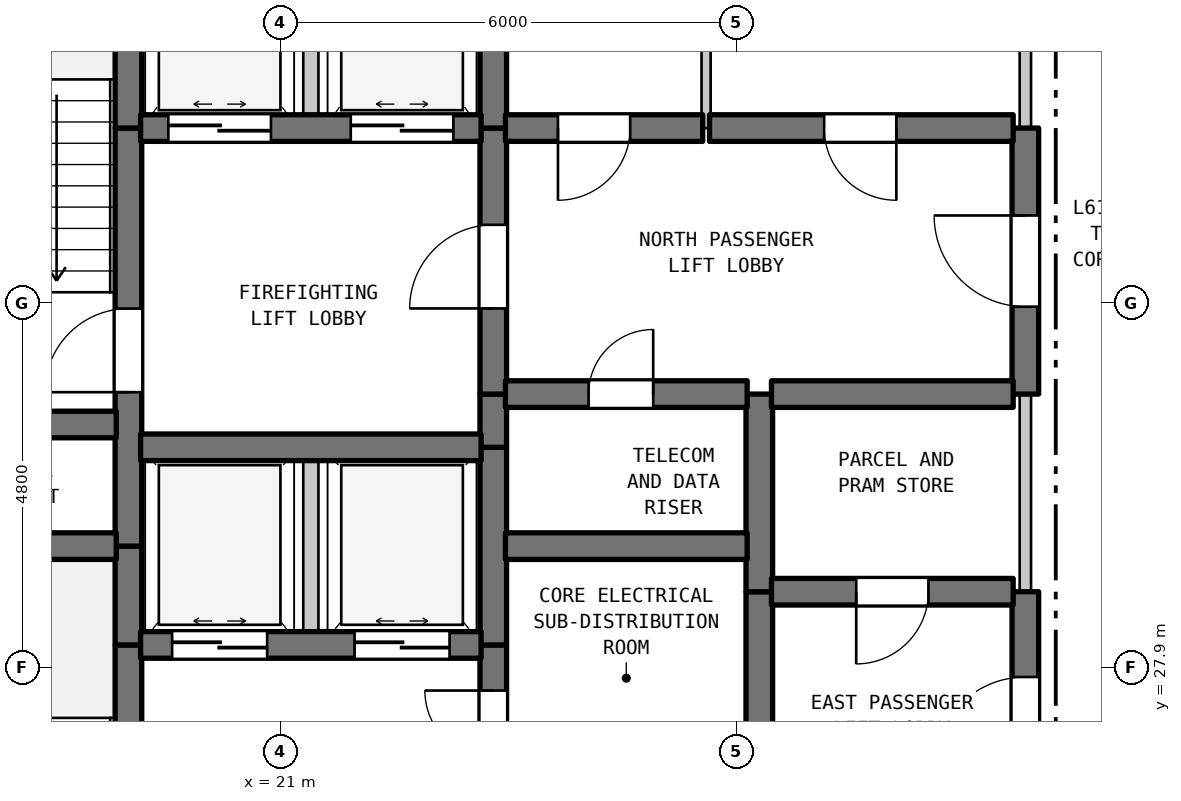
"""IFC4 building model, lengths in metres.
Left out: names, types, materials, properties, quantities, classifications, styles, units other than length and angle.
Written with IfcOpenShell. Run it as: python <this file> out.ifc"""

import sys

from ifc_helpers import new_model, si_unit, direction, frame, frame_2d, origin, place, context, subcontext, project, spatial, rectangle, extrude, element, fill, save


model = new_model("IFC4")
c1 = context("Model", 3, precision=1e-05, world=origin(), true_north=direction((0.0, 1.0)))
c2 = subcontext(c1, "Body", "Model", "MODEL_VIEW")
j1 = project(units=[si_unit("LENGTHUNIT", "METRE"), si_unit("PLANEANGLEUNIT", "RADIAN")], contexts=[c1])
p1 = place(None, origin())
s1 = spatial("IfcSite", under=j1, at=p1, CompositionType="ELEMENT")
p2 = place(p1, origin())
s2 = spatial("IfcBuilding", under=s1, at=p2, CompositionType="ELEMENT")
p3 = place(p2, frame((0.0, 0.0, 247.3)))
s3 = spatial("IfcBuildingStorey", under=s2, at=p3, CompositionType="ELEMENT", Elevation=247.3)
p4 = place(p3, frame((19.0, 22.7, 0.0), z_axis=(0.0, 0.0, 1.0), x_axis=(0.0, 1.0, 0.0)))
e1 = element("IfcWall", 1, at=p4, inside=s3, PredefinedType="SHEAR", context=c2, shape_type="SweptSolid", body=[
    extrude(rectangle(XDim=5.5, YDim=0.35, at=frame_2d((2.75, 0.0))), origin(), (0.0, 0.0, 1.0), 3.39),
])
p5 = place(p4, frame((0.631, 0.0, 0.0)))
e2 = element("IfcOpeningElement", 2, at=p5, cuts=e1, PredefinedType="OPENING", context=c2, shape_type="SweptSolid", body=[
    extrude(rectangle(XDim=1.1, YDim=2.15, at=frame_2d((0.55, 1.075))), frame((0.0, 0.185, 0.0), z_axis=(0.0, -1.0, 0.0), x_axis=(1.0, 0.0, 0.0)), (0.0, 0.0, 1.0), 0.37),
])
p6 = place(p3, frame((19.0, 28.2, 0.0), z_axis=(0.0, 0.0, 1.0), x_axis=(0.0, 1.0, 0.0)))
e3 = element("IfcWall", 3, at=p6, inside=s3, PredefinedType="SHEAR", context=c2, shape_type="SweptSolid", body=[
    extrude(rectangle(XDim=1.3, YDim=0.35, at=frame_2d((0.65, 0.0))), origin(), (0.0, 0.0, 1.0), 3.39),
])
p7 = place(p3, frame((19.0, 29.5, 0.0), z_axis=(0.0, 0.0, 1.0), x_axis=(0.0, 1.0, 0.0)))
e4 = element("IfcWall", 4, at=p7, inside=s3, PredefinedType="SHEAR", context=c2, shape_type="SweptSolid", body=[
    extrude(rectangle(XDim=5.5, YDim=0.35, at=frame_2d((2.75, 0.0))), origin(), (0.0, 0.0, 1.0), 3.39),
])
p8 = place(p7, frame((2.025, 0.0, 0.0)))
e5 = element("IfcOpeningElement", 5, at=p8, cuts=e4, PredefinedType="OPENING", context=c2, shape_type="SweptSolid", body=[
    extrude(rectangle(XDim=1.1, YDim=2.15, at=frame_2d((0.55, 1.075))), frame((0.0, 0.185, 0.0), z_axis=(0.0, -1.0, 0.0), x_axis=(1.0, 0.0, 0.0)), (0.0, 0.0, 1.0), 0.37),
])
p9 = place(p3, frame((19.0, 35.0, 0.0), z_axis=(0.0, 0.0, 1.0), x_axis=(0.0, 1.0, 0.0)))
e6 = element("IfcWall", 6, at=p9, inside=s3, PredefinedType="SHEAR", context=c2, shape_type="SweptSolid", body=[
    extrude(rectangle(XDim=2.9, YDim=0.35, at=frame_2d((1.45, 0.0))), origin(), (0.0, 0.0, 1.0), 3.39),
])
p10 = place(p3, frame((21.4, 28.2, 0.0), z_axis=(0.0, 0.0, 1.0), x_axis=(0.0, 1.0, 0.0)))
e7 = element("IfcWall", 7, at=p10, inside=s3, PredefinedType="STANDARD", context=c2, shape_type="SweptSolid", body=[
    extrude(rectangle(XDim=2.6, YDim=0.2, at=frame_2d((1.3, 0.0))), origin(), (0.0, 0.0, 1.0), 3.39),
])
p11 = place(p3, frame((21.4, 35.0, 0.0), z_axis=(0.0, 0.0, 1.0), x_axis=(0.0, 1.0, 0.0)))
e8 = element("IfcWall", 8, at=p11, inside=s3, PredefinedType="STANDARD", context=c2, shape_type="SweptSolid", body=[
    extrude(rectangle(XDim=2.9, YDim=0.2, at=frame_2d((1.45, 0.0))), origin(), (0.0, 0.0, 1.0), 3.39),
])
p12 = place(p3, frame((23.8, 26.1, 0.0), z_axis=(0.0, 0.0, 1.0), x_axis=(0.0, 1.0, 0.0)))
e9 = element("IfcWall", 9, at=p12, inside=s3, PredefinedType="SHEAR", context=c2, shape_type="SweptSolid", body=[
    extrude(rectangle(XDim=2.1, YDim=0.35, at=frame_2d((1.05, 0.0))), origin(), (0.0, 0.0, 1.0), 3.39),
])
p13 = place(p12, frame((0.6, 0.0, 0.0)))
e10 = element("IfcOpeningElement", 10, at=p13, cuts=e9, PredefinedType="OPENING", context=c2, shape_type="SweptSolid", body=[
    extrude(rectangle(XDim=0.9, YDim=2.15, at=frame_2d((0.45, 1.075))), frame((0.0, 0.185, 0.0), z_axis=(0.0, -1.0, 0.0), x_axis=(1.0, 0.0, 0.0)), (0.0, 0.0, 1.0), 0.37),
])
p14 = place(p3, frame((23.8, 28.2, 0.0), z_axis=(0.0, 0.0, 1.0), x_axis=(0.0, 1.0, 0.0)))
e11 = element("IfcWall", 11, at=p14, inside=s3, PredefinedType="SHEAR", context=c2, shape_type="SweptSolid", body=[
    extrude(rectangle(XDim=2.6, YDim=0.35, at=frame_2d((1.3, 0.0))), origin(), (0.0, 0.0, 1.0), 3.39),
])
p15 = place(p3, frame((23.8, 30.8, 0.0), z_axis=(0.0, 0.0, 1.0), x_axis=(0.0, 1.0, 0.0)))
e12 = element("IfcWall", 12, at=p15, inside=s3, PredefinedType="SHEAR", context=c2, shape_type="SweptSolid", body=[
    extrude(rectangle(XDim=0.7, YDim=0.35, at=frame_2d((0.35, 0.0))), origin(), (0.0, 0.0, 1.0), 3.39),
])
p16 = place(p3, frame((23.8, 31.5, 0.0), z_axis=(0.0, 0.0, 1.0), x_axis=(0.0, 1.0, 0.0)))
e13 = element("IfcWall", 13, at=p16, inside=s3, PredefinedType="SHEAR", context=c2, shape_type="SweptSolid", body=[
    extrude(rectangle(XDim=3.5, YDim=0.35, at=frame_2d((1.75, 0.0))), origin(), (0.0, 0.0, 1.0), 3.39),
])
p17 = place(p16, frame((1.127, 0.0, 0.0)))
e14 = element("IfcOpeningElement", 14, at=p17, cuts=e13, PredefinedType="OPENING", context=c2, shape_type="SweptSolid", body=[
    extrude(rectangle(XDim=1.1, YDim=2.15, at=frame_2d((0.55, 1.075))), frame((0.0, 0.185, 0.0), z_axis=(0.0, -1.0, 0.0), x_axis=(1.0, 0.0, 0.0)), (0.0, 0.0, 1.0), 0.37),
])
p18 = place(p3, frame((23.8, 35.0, 0.0), z_axis=(0.0, 0.0, 1.0), x_axis=(0.0, 1.0, 0.0)))
e15 = element("IfcWall", 15, at=p18, inside=s3, PredefinedType="SHEAR", context=c2, shape_type="SweptSolid", body=[
    extrude(rectangle(XDim=2.9, YDim=0.35, at=frame_2d((1.45, 0.0))), origin(), (0.0, 0.0, 1.0), 3.39),
])
p19 = place(p3, frame((26.6, 35.0, 0.0), z_axis=(0.0, 0.0, 1.0), x_axis=(0.0, 1.0, 0.0)))
e16 = element("IfcWall", 16, at=p19, inside=s3, PredefinedType="PARTITIONING", context=c2, shape_type="SweptSolid", body=[
    extrude(rectangle(XDim=2.9, YDim=0.12, at=frame_2d((1.45, 0.0))), origin(), (0.0, 0.0, 1.0), 3.39),
])
p20 = place(p3, frame((27.3, 26.1, 0.0), z_axis=(0.0, 0.0, 1.0), x_axis=(0.0, 1.0, 0.0)))
e17 = element("IfcWall", 17, at=p20, inside=s3, PredefinedType="SHEAR", context=c2, shape_type="SweptSolid", body=[
    extrude(rectangle(XDim=2.8, YDim=0.35, at=frame_2d((1.4, 0.0))), origin(), (0.0, 0.0, 1.0), 3.39),
])
p21 = place(p3, frame((27.3, 28.9, 0.0), z_axis=(0.0, 0.0, 1.0), x_axis=(0.0, 1.0, 0.0)))
e18 = element("IfcWall", 18, at=p21, inside=s3, PredefinedType="SHEAR", context=c2, shape_type="SweptSolid", body=[
    extrude(rectangle(XDim=2.6, YDim=0.35, at=frame_2d((1.3, 0.0))), origin(), (0.0, 0.0, 1.0), 3.39),
])
p22 = place(p3, frame((30.8, 25.6, 0.0), z_axis=(0.0, 0.0, 1.0), x_axis=(0.0, 1.0, 0.0)))
e19 = element("IfcWall", 19, at=p22, inside=s3, PredefinedType="SHEAR", context=c2, shape_type="SweptSolid", body=[
    extrude(rectangle(XDim=3.3, YDim=0.35, at=frame_2d((1.65, 0.0))), origin(), (0.0, 0.0, 1.0), 3.39),
])
p23 = place(p22, frame((0.978, 0.0, 0.0)))
e20 = element("IfcOpeningElement", 20, at=p23, cuts=e19, PredefinedType="OPENING", context=c2, shape_type="SweptSolid", body=[
    extrude(rectangle(XDim=1.2, YDim=2.2, at=frame_2d((0.6, 1.1))), frame((0.0, 0.185, 0.0), z_axis=(0.0, -1.0, 0.0), x_axis=(1.0, 0.0, 0.0)), (0.0, 0.0, 1.0), 0.37),
])
p24 = place(p3, frame((30.8, 28.9, 0.0), z_axis=(0.0, 0.0, 1.0), x_axis=(0.0, 1.0, 0.0)))
e21 = element("IfcWall", 21, at=p24, inside=s3, PredefinedType="STANDARD", context=c2, shape_type="SweptSolid", body=[
    extrude(rectangle(XDim=2.6, YDim=0.15, at=frame_2d((1.3, 0.0))), origin(), (0.0, 0.0, 1.0), 3.39),
])
p25 = place(p3, frame((30.8, 31.5, 0.0), z_axis=(0.0, 0.0, 1.0), x_axis=(0.0, 1.0, 0.0)))
e22 = element("IfcWall", 22, at=p25, inside=s3, PredefinedType="SHEAR", context=c2, shape_type="SweptSolid", body=[
    extrude(rectangle(XDim=3.5, YDim=0.35, at=frame_2d((1.75, 0.0))), origin(), (0.0, 0.0, 1.0), 3.39),
])
p26 = place(p25, frame((1.15, 0.0, 0.0)))
e23 = element("IfcOpeningElement", 23, at=p26, cuts=e22, PredefinedType="OPENING", context=c2, shape_type="SweptSolid", body=[
    extrude(rectangle(XDim=1.2, YDim=2.2, at=frame_2d((0.6, 1.1))), frame((0.0, 0.185, 0.0), z_axis=(0.0, -1.0, 0.0), x_axis=(1.0, 0.0, 0.0)), (0.0, 0.0, 1.0), 0.37),
])
p27 = place(p3, frame((30.8, 35.0, 0.0), z_axis=(0.0, 0.0, 1.0), x_axis=(0.0, 1.0, 0.0)))
e24 = element("IfcWall", 24, at=p27, inside=s3, PredefinedType="STANDARD", context=c2, shape_type="SweptSolid", body=[
    extrude(rectangle(XDim=2.9, YDim=0.15, at=frame_2d((1.45, 0.0))), origin(), (0.0, 0.0, 1.0), 3.39),
])
p28 = place(p3, frame((19.16, 28.2, 0.0), z_axis=(0.0, 0.0, 1.0), x_axis=(1.0, 0.0, 0.0)))
e25 = element("IfcWall", 25, at=p28, inside=s3, PredefinedType="SHEAR", context=c2, shape_type="SweptSolid", body=[
    extrude(rectangle(XDim=4.48, YDim=0.35, at=frame_2d((2.24, 0.0))), origin(), (0.0, 0.0, 1.0), 3.39),
])
p29 = place(p28, frame((0.415, 0.0, 0.0)))
e26 = element("IfcOpeningElement", 26, at=p29, cuts=e25, PredefinedType="OPENING", context=c2, shape_type="SweptSolid", body=[
    extrude(rectangle(XDim=1.25, YDim=2.2, at=frame_2d((0.625, 1.1))), frame((0.0, 0.185, 0.0), z_axis=(0.0, -1.0, 0.0), x_axis=(1.0, 0.0, 0.0)), (0.0, 0.0, 1.0), 0.37),
])
p30 = place(p28, frame((2.815, 0.0, 0.0)))
e27 = element("IfcOpeningElement", 27, at=p30, cuts=e25, PredefinedType="OPENING", context=c2, shape_type="SweptSolid", body=[
    extrude(rectangle(XDim=1.25, YDim=2.2, at=frame_2d((0.625, 1.1))), frame((0.0, 0.185, 0.0), z_axis=(0.0, -1.0, 0.0), x_axis=(1.0, 0.0, 0.0)), (0.0, 0.0, 1.0), 0.37),
])
p31 = place(p3, frame((27.46, 28.9, 0.0), z_axis=(0.0, 0.0, 1.0), x_axis=(1.0, 0.0, 0.0)))
e28 = element("IfcWall", 28, at=p31, inside=s3, PredefinedType="SHEAR", context=c2, shape_type="SweptSolid", body=[
    extrude(rectangle(XDim=3.18, YDim=0.35, at=frame_2d((1.59, 0.0))), origin(), (0.0, 0.0, 1.0), 3.39),
])
p32 = place(p31, frame((1.115, 0.0, 0.0)))
e29 = element("IfcOpeningElement", 29, at=p32, cuts=e28, PredefinedType="OPENING", context=c2, shape_type="SweptSolid", body=[
    extrude(rectangle(XDim=0.95, YDim=2.15, at=frame_2d((0.475, 1.075))), frame((0.0, 0.185, 0.0), z_axis=(0.0, -1.0, 0.0), x_axis=(1.0, 0.0, 0.0)), (0.0, 0.0, 1.0), 0.37),
])
p33 = place(p3, frame((15.16, 29.5, 0.0), z_axis=(0.0, 0.0, 1.0), x_axis=(1.0, 0.0, 0.0)))
e30 = element("IfcWall", 30, at=p33, inside=s3, PredefinedType="SHEAR", context=c2, shape_type="SweptSolid", body=[
    extrude(rectangle(XDim=3.68, YDim=0.35, at=frame_2d((1.84, 0.0))), origin(), (0.0, 0.0, 1.0), 3.39),
])
p34 = place(p3, frame((23.96, 29.5, 0.0), z_axis=(0.0, 0.0, 1.0), x_axis=(1.0, 0.0, 0.0)))
e31 = element("IfcWall", 31, at=p34, inside=s3, PredefinedType="SHEAR", context=c2, shape_type="SweptSolid", body=[
    extrude(rectangle(XDim=3.18, YDim=0.35, at=frame_2d((1.59, 0.0))), origin(), (0.0, 0.0, 1.0), 3.39),
])
p35 = place(p3, frame((19.16, 30.8, 0.0), z_axis=(0.0, 0.0, 1.0), x_axis=(1.0, 0.0, 0.0)))
e32 = element("IfcWall", 32, at=p35, inside=s3, PredefinedType="SHEAR", context=c2, shape_type="SweptSolid", body=[
    extrude(rectangle(XDim=4.48, YDim=0.35, at=frame_2d((2.24, 0.0))), origin(), (0.0, 0.0, 1.0), 3.39),
])
p36 = place(p3, frame((15.16, 31.1, 0.0), z_axis=(0.0, 0.0, 1.0), x_axis=(1.0, 0.0, 0.0)))
e33 = element("IfcWall", 33, at=p36, inside=s3, PredefinedType="SHEAR", context=c2, shape_type="SweptSolid", body=[
    extrude(rectangle(XDim=3.68, YDim=0.35, at=frame_2d((1.84, 0.0))), origin(), (0.0, 0.0, 1.0), 3.39),
])
p37 = place(p3, frame((23.96, 31.5, 0.0), z_axis=(0.0, 0.0, 1.0), x_axis=(1.0, 0.0, 0.0)))
e34 = element("IfcWall", 34, at=p37, inside=s3, PredefinedType="SHEAR", context=c2, shape_type="SweptSolid", body=[
    extrude(rectangle(XDim=3.18, YDim=0.35, at=frame_2d((1.59, 0.0))), origin(), (0.0, 0.0, 1.0), 3.39),
])
p38 = place(p37, frame((1.094, 0.0, 0.0)))
e35 = element("IfcOpeningElement", 35, at=p38, cuts=e34, PredefinedType="OPENING", context=c2, shape_type="SweptSolid", body=[
    extrude(rectangle(XDim=0.85, YDim=2.1, at=frame_2d((0.425, 1.05))), frame((0.0, 0.185, 0.0), z_axis=(0.0, -1.0, 0.0), x_axis=(1.0, 0.0, 0.0)), (0.0, 0.0, 1.0), 0.37),
])
p39 = place(p3, frame((27.46, 31.5, 0.0), z_axis=(0.0, 0.0, 1.0), x_axis=(1.0, 0.0, 0.0)))
e36 = element("IfcWall", 36, at=p39, inside=s3, PredefinedType="SHEAR", context=c2, shape_type="SweptSolid", body=[
    extrude(rectangle(XDim=3.18, YDim=0.35, at=frame_2d((1.59, 0.0))), origin(), (0.0, 0.0, 1.0), 3.39),
])
p40 = place(p3, frame((19.16, 35.0, 0.0), z_axis=(0.0, 0.0, 1.0), x_axis=(1.0, 0.0, 0.0)))
e37 = element("IfcWall", 37, at=p40, inside=s3, PredefinedType="SHEAR", context=c2, shape_type="SweptSolid", body=[
    extrude(rectangle(XDim=4.48, YDim=0.35, at=frame_2d((2.24, 0.0))), origin(), (0.0, 0.0, 1.0), 3.39),
])
p41 = place(p40, frame((0.365, 0.0, 0.0)))
e38 = element("IfcOpeningElement", 38, at=p41, cuts=e37, PredefinedType="OPENING", context=c2, shape_type="SweptSolid", body=[
    extrude(rectangle(XDim=1.35, YDim=2.2, at=frame_2d((0.675, 1.1))), frame((0.0, 0.185, 0.0), z_axis=(0.0, -1.0, 0.0), x_axis=(1.0, 0.0, 0.0)), (0.0, 0.0, 1.0), 0.37),
])
p42 = place(p40, frame((2.765, 0.0, 0.0)))
e39 = element("IfcOpeningElement", 39, at=p42, cuts=e37, PredefinedType="OPENING", context=c2, shape_type="SweptSolid", body=[
    extrude(rectangle(XDim=1.35, YDim=2.2, at=frame_2d((0.675, 1.1))), frame((0.0, 0.185, 0.0), z_axis=(0.0, -1.0, 0.0), x_axis=(1.0, 0.0, 0.0)), (0.0, 0.0, 1.0), 0.37),
])
p43 = place(p3, frame((23.96, 35.0, 0.0), z_axis=(0.0, 0.0, 1.0), x_axis=(1.0, 0.0, 0.0)))
e40 = element("IfcWall", 40, at=p43, inside=s3, PredefinedType="SHEAR", context=c2, shape_type="SweptSolid", body=[
    extrude(rectangle(XDim=2.595, YDim=0.35, at=frame_2d((1.297, 0.0))), origin(), (0.0, 0.0, 1.0), 3.39),
])
p44 = place(p43, frame((0.691, 0.0, 0.0)))
e41 = element("IfcOpeningElement", 41, at=p44, cuts=e40, PredefinedType="OPENING", context=c2, shape_type="SweptSolid", body=[
    extrude(rectangle(XDim=0.95, YDim=2.15, at=frame_2d((0.475, 1.075))), frame((0.0, 0.185, 0.0), z_axis=(0.0, -1.0, 0.0), x_axis=(1.0, 0.0, 0.0)), (0.0, 0.0, 1.0), 0.37),
])
p45 = place(p3, frame((26.645, 35.0, 0.0), z_axis=(0.0, 0.0, 1.0), x_axis=(1.0, 0.0, 0.0)))
e42 = element("IfcWall", 42, at=p45, inside=s3, PredefinedType="SHEAR", context=c2, shape_type="SweptSolid", body=[
    extrude(rectangle(XDim=3.995, YDim=0.35, at=frame_2d((1.998, 0.0))), origin(), (0.0, 0.0, 1.0), 3.39),
])
p46 = place(p45, frame((1.508, 0.0, 0.0)))
e43 = element("IfcOpeningElement", 43, at=p46, cuts=e42, PredefinedType="OPENING", context=c2, shape_type="SweptSolid", body=[
    extrude(rectangle(XDim=0.95, YDim=2.15, at=frame_2d((0.475, 1.075))), frame((0.0, 0.185, 0.0), z_axis=(0.0, -1.0, 0.0), x_axis=(1.0, 0.0, 0.0)), (0.0, 0.0, 1.0), 0.37),
])
p47 = place(p8, origin())
e44 = element("IfcDoor", 44, at=p47, inside=s3, OperationType="SINGLE_SWING_LEFT", PredefinedType="DOOR", context=c2, shape_type="SweptSolid", body=[
    extrude(rectangle(XDim=1.1, YDim=2.15, at=frame_2d((0.55, 1.075))), frame((0.0, 0.025, 0.0), z_axis=(0.0, -1.0, 0.0), x_axis=(1.0, 0.0, 0.0)), (0.0, 0.0, 1.0), 0.05),
])
fill(e5, e44)
p48 = place(p13, origin())
e45 = element("IfcDoor", 45, at=p48, inside=s3, OperationType="SINGLE_SWING_RIGHT", PredefinedType="DOOR", context=c2, shape_type="SweptSolid", body=[
    extrude(rectangle(XDim=0.9, YDim=2.15, at=frame_2d((0.45, 1.075))), frame((0.0, 0.025, 0.0), z_axis=(0.0, -1.0, 0.0), x_axis=(1.0, 0.0, 0.0)), (0.0, 0.0, 1.0), 0.05),
])
fill(e10, e45)
p49 = place(p17, origin())
e46 = element("IfcDoor", 46, at=p49, inside=s3, OperationType="SINGLE_SWING_LEFT", PredefinedType="DOOR", context=c2, shape_type="SweptSolid", body=[
    extrude(rectangle(XDim=1.1, YDim=2.15, at=frame_2d((0.55, 1.075))), frame((0.0, 0.025, 0.0), z_axis=(0.0, -1.0, 0.0), x_axis=(1.0, 0.0, 0.0)), (0.0, 0.0, 1.0), 0.05),
])
fill(e14, e46)
p50 = place(p23, origin())
e47 = element("IfcDoor", 47, at=p50, inside=s3, OperationType="SINGLE_SWING_LEFT", PredefinedType="DOOR", context=c2, shape_type="SweptSolid", body=[
    extrude(rectangle(XDim=1.2, YDim=2.2, at=frame_2d((0.6, 1.1))), frame((0.0, 0.025, 0.0), z_axis=(0.0, -1.0, 0.0), x_axis=(1.0, 0.0, 0.0)), (0.0, 0.0, 1.0), 0.05),
])
fill(e20, e47)
p51 = place(p26, origin())
e48 = element("IfcDoor", 48, at=p51, inside=s3, OperationType="SINGLE_SWING_RIGHT", PredefinedType="DOOR", context=c2, shape_type="SweptSolid", body=[
    extrude(rectangle(XDim=1.2, YDim=2.2, at=frame_2d((0.6, 1.1))), frame((0.0, 0.025, 0.0), z_axis=(0.0, -1.0, 0.0), x_axis=(1.0, 0.0, 0.0)), (0.0, 0.0, 1.0), 0.05),
])
fill(e23, e48)
p52 = place(p29, origin())
e49 = element("IfcDoor", 49, at=p52, inside=s3, OperationType="DOUBLE_DOOR_SLIDING", PredefinedType="DOOR", context=c2, shape_type="SweptSolid", body=[
    extrude(rectangle(XDim=1.25, YDim=2.2, at=frame_2d((0.625, 1.1))), frame((0.0, 0.025, 0.0), z_axis=(0.0, -1.0, 0.0), x_axis=(1.0, 0.0, 0.0)), (0.0, 0.0, 1.0), 0.05),
])
fill(e26, e49)
p53 = place(p30, origin())
e50 = element("IfcDoor", 50, at=p53, inside=s3, OperationType="DOUBLE_DOOR_SLIDING", PredefinedType="DOOR", context=c2, shape_type="SweptSolid", body=[
    extrude(rectangle(XDim=1.25, YDim=2.2, at=frame_2d((0.625, 1.1))), frame((0.0, 0.025, 0.0), z_axis=(0.0, -1.0, 0.0), x_axis=(1.0, 0.0, 0.0)), (0.0, 0.0, 1.0), 0.05),
])
fill(e27, e50)
p54 = place(p32, frame((0.95, 0.0, 0.0), z_axis=(0.0, 0.0, 1.0), x_axis=(-1.0, 0.0, 0.0)))
e51 = element("IfcDoor", 51, at=p54, inside=s3, OperationType="SINGLE_SWING_LEFT", PredefinedType="DOOR", context=c2, shape_type="SweptSolid", body=[
    extrude(rectangle(XDim=0.95, YDim=2.15, at=frame_2d((0.475, 1.075))), frame((0.0, 0.025, 0.0), z_axis=(0.0, -1.0, 0.0), x_axis=(1.0, 0.0, 0.0)), (0.0, 0.0, 1.0), 0.05),
])
fill(e29, e51)
p55 = place(p38, origin())
e52 = element("IfcDoor", 52, at=p55, inside=s3, OperationType="SINGLE_SWING_RIGHT", PredefinedType="DOOR", context=c2, shape_type="SweptSolid", body=[
    extrude(rectangle(XDim=0.85, YDim=2.1, at=frame_2d((0.425, 1.05))), frame((0.0, 0.025, 0.0), z_axis=(0.0, -1.0, 0.0), x_axis=(1.0, 0.0, 0.0)), (0.0, 0.0, 1.0), 0.05),
])
fill(e35, e52)
p56 = place(p41, origin())
e53 = element("IfcDoor", 53, at=p56, inside=s3, OperationType="DOUBLE_DOOR_SLIDING", PredefinedType="DOOR", context=c2, shape_type="SweptSolid", body=[
    extrude(rectangle(XDim=1.35, YDim=2.2, at=frame_2d((0.675, 1.1))), frame((0.0, 0.025, 0.0), z_axis=(0.0, -1.0, 0.0), x_axis=(1.0, 0.0, 0.0)), (0.0, 0.0, 1.0), 0.05),
])
fill(e38, e53)
p57 = place(p42, origin())
e54 = element("IfcDoor", 54, at=p57, inside=s3, OperationType="DOUBLE_DOOR_SLIDING", PredefinedType="DOOR", context=c2, shape_type="SweptSolid", body=[
    extrude(rectangle(XDim=1.35, YDim=2.2, at=frame_2d((0.675, 1.1))), frame((0.0, 0.025, 0.0), z_axis=(0.0, -1.0, 0.0), x_axis=(1.0, 0.0, 0.0)), (0.0, 0.0, 1.0), 0.05),
])
fill(e39, e54)
p58 = place(p44, frame((0.95, 0.0, 0.0), z_axis=(0.0, 0.0, 1.0), x_axis=(-1.0, 0.0, 0.0)))
e55 = element("IfcDoor", 55, at=p58, inside=s3, OperationType="SINGLE_SWING_LEFT", PredefinedType="DOOR", context=c2, shape_type="SweptSolid", body=[
    extrude(rectangle(XDim=0.95, YDim=2.15, at=frame_2d((0.475, 1.075))), frame((0.0, 0.025, 0.0), z_axis=(0.0, -1.0, 0.0), x_axis=(1.0, 0.0, 0.0)), (0.0, 0.0, 1.0), 0.05),
])
fill(e41, e55)
p59 = place(p46, frame((0.95, 0.0, 0.0), z_axis=(0.0, 0.0, 1.0), x_axis=(-1.0, 0.0, 0.0)))
e56 = element("IfcDoor", 56, at=p59, inside=s3, OperationType="SINGLE_SWING_RIGHT", PredefinedType="DOOR", context=c2, shape_type="SweptSolid", body=[
    extrude(rectangle(XDim=0.95, YDim=2.15, at=frame_2d((0.475, 1.075))), frame((0.0, 0.025, 0.0), z_axis=(0.0, -1.0, 0.0), x_axis=(1.0, 0.0, 0.0)), (0.0, 0.0, 1.0), 0.05),
])
fill(e43, e56)
save(model, sys.argv[1])
